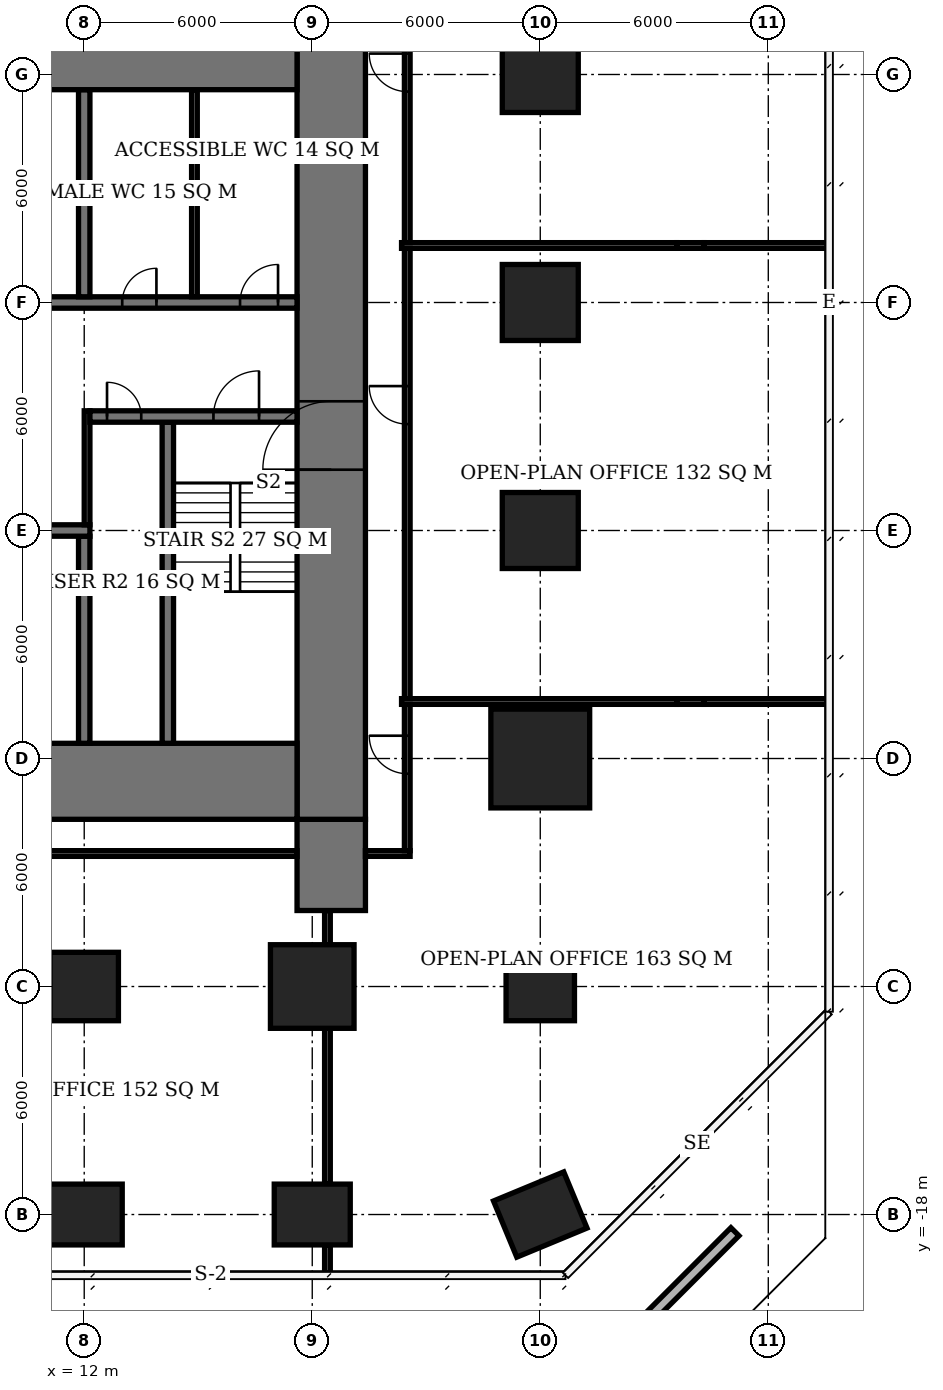
"""IFC4 building model, lengths in metres.
Left out: names, types, materials, properties, quantities, classifications, styles, units other than length and angle.
Written with IfcOpenShell. Run it as: python <this file> out.ifc"""

import sys

from ifc_helpers import new_model, si_unit, direction, frame, frame_2d, origin, origin_2d, place, context, subcontext, project, spatial, rectangle, extrude, element, fill, save


model = new_model("IFC4")
c1 = context("Model", 3, precision=1e-05, world=origin(), true_north=direction((0.0, 1.0)))
c2 = subcontext(c1, "Body", "Model", "MODEL_VIEW")
j1 = project(units=[si_unit("LENGTHUNIT", "METRE"), si_unit("PLANEANGLEUNIT", "RADIAN")], contexts=[c1])
p1 = place(None, origin())
s1 = spatial("IfcSite", under=j1, at=p1, CompositionType="ELEMENT")
p2 = place(p1, origin())
s2 = spatial("IfcBuilding", under=s1, at=p2, CompositionType="ELEMENT")
p3 = place(p2, frame((0.0, 0.0, 65.0)))
s3 = spatial("IfcBuildingStorey", under=s2, at=p3, CompositionType="ELEMENT", Elevation=65.0)
p4 = place(p3, frame((12.0, -18.0, 0.0), z_axis=(0.0, 0.0, 1.0), x_axis=(1.0, 0.0, 0.0)))
e1 = element("IfcColumn", 1, at=p4, inside=s3, PredefinedType="COLUMN", context=c2, shape_type="SweptSolid", body=[
    extrude(rectangle(XDim=2.0, YDim=1.6, at=origin_2d()), origin(), (0.0, 0.0, 1.0), 3.9),
])
p5 = place(p3, frame((12.0, -12.0, 0.0), z_axis=(0.0, 0.0, 1.0), x_axis=(1.0, 0.0, 0.0)))
e2 = element("IfcColumn", 2, at=p5, inside=s3, PredefinedType="COLUMN", context=c2, shape_type="SweptSolid", body=[
    extrude(rectangle(XDim=1.8, YDim=1.8, at=origin_2d()), origin(), (0.0, 0.0, 1.0), 3.9),
])
p6 = place(p3, frame((18.0, -18.0, 0.0), z_axis=(0.0, 0.0, 1.0), x_axis=(1.0, 0.0, 0.0)))
e3 = element("IfcColumn", 3, at=p6, inside=s3, PredefinedType="COLUMN", context=c2, shape_type="SweptSolid", body=[
    extrude(rectangle(XDim=2.0, YDim=1.6, at=origin_2d()), origin(), (0.0, 0.0, 1.0), 3.9),
])
p7 = place(p3, frame((18.0, -12.0, 0.0), z_axis=(0.0, 0.0, 1.0), x_axis=(1.0, 0.0, 0.0)))
e4 = element("IfcColumn", 4, at=p7, inside=s3, PredefinedType="COLUMN", context=c2, shape_type="SweptSolid", body=[
    extrude(rectangle(XDim=2.2, YDim=2.2, at=origin_2d()), origin(), (0.0, 0.0, 1.0), 3.9),
])
p8 = place(p3, frame((24.0, -18.0, 0.0), z_axis=(0.0, 0.0, 1.0), x_axis=(-0.923879532511, -0.382683432365, 0.0)))
e5 = element("IfcColumn", 5, at=p8, inside=s3, PredefinedType="COLUMN", context=c2, shape_type="SweptSolid", body=[
    extrude(rectangle(XDim=2.0, YDim=1.6, at=origin_2d()), origin(), (0.0, 0.0, 1.0), 3.9),
])
p9 = place(p3, frame((24.0, -12.0, 0.0), z_axis=(0.0, 0.0, 1.0), x_axis=(1.0, 0.0, 0.0)))
e6 = element("IfcColumn", 6, at=p9, inside=s3, PredefinedType="COLUMN", context=c2, shape_type="SweptSolid", body=[
    extrude(rectangle(XDim=1.8, YDim=1.8, at=origin_2d()), origin(), (0.0, 0.0, 1.0), 3.9),
])
p10 = place(p3, frame((24.0, -6.0, 0.0), z_axis=(0.0, 0.0, 1.0), x_axis=(1.0, 0.0, 0.0)))
e7 = element("IfcColumn", 7, at=p10, inside=s3, PredefinedType="COLUMN", context=c2, shape_type="SweptSolid", body=[
    extrude(rectangle(XDim=2.6, YDim=2.6, at=origin_2d()), origin(), (0.0, 0.0, 1.0), 3.9),
])
for number, where, z_axis, x_axis in (
    (8, (24.0, 0.0, 0.0), (0.0, 0.0, 1.0), (1.0, 0.0, 0.0)),
    (9, (24.0, 6.0, 0.0), (0.0, 0.0, 1.0), (1.0, 0.0, 0.0)),
    (10, (24.0, 12.0, 0.0), (0.0, 0.0, 1.0), (1.0, 0.0, 0.0)),
):
    element("IfcColumn", number, at=place(p3, frame(where, z_axis=z_axis, x_axis=x_axis)), inside=s3, PredefinedType="COLUMN", context=c2, shape_type="SweptSolid", body=[
        extrude(rectangle(XDim=2.0, YDim=2.0, at=origin_2d()), origin(), (0.0, 0.0, 1.0), 3.9),
    ])
for number, where, z_axis, x_axis in (
    (11, (-5.6, -6.6, 0.0), (0.0, 0.0, 1.0), (1.0, 0.0, 0.0)),
    (12, (-5.6, 12.6, 0.0), (0.0, 0.0, 1.0), (1.0, 0.0, 0.0)),
):
    element("IfcWall", number, at=place(p3, frame(where, z_axis=z_axis, x_axis=x_axis)), inside=s3, PredefinedType="SHEAR", context=c2, shape_type="SweptSolid", body=[
        extrude(rectangle(XDim=23.2, YDim=2.0, at=frame_2d((11.6, 0.0))), origin(), (0.0, 0.0, 1.0), 3.9),
    ])
p11 = place(p3, frame((18.5, -7.6, 0.0), z_axis=(0.0, 0.0, 1.0), x_axis=(0.0, 1.0, 0.0)))
e13 = element("IfcWall", 13, at=p11, inside=s3, PredefinedType="SHEAR", context=c2, shape_type="SweptSolid", body=[
    extrude(rectangle(XDim=21.2, YDim=1.8, at=frame_2d((10.6, 0.0))), origin(), (0.0, 0.0, 1.0), 3.9),
])
p12 = place(p11, frame((9.2, 0.0, 0.0)))
e14 = element("IfcOpeningElement", 14, at=p12, cuts=e13, PredefinedType="OPENING", context=c2, shape_type="SweptSolid", body=[
    extrude(rectangle(XDim=1.8, YDim=2.4, at=frame_2d((0.9, 1.2))), frame((0.0, 0.91, 0.0), z_axis=(0.0, -1.0, 0.0), x_axis=(1.0, 0.0, 0.0)), (0.0, 0.0, 1.0), 1.82),
])
p13 = place(p3, frame((18.5, -10.0, 0.0), z_axis=(0.0, 0.0, 1.0), x_axis=(0.0, 1.0, 0.0)))
e15 = element("IfcWall", 15, at=p13, inside=s3, PredefinedType="SHEAR", context=c2, shape_type="SweptSolid", body=[
    extrude(rectangle(XDim=2.4, YDim=1.8, at=frame_2d((1.2, 0.0))), origin(), (0.0, 0.0, 1.0), 3.9),
])
p14 = place(p3, frame((-5.6, 0.0, 0.0), z_axis=(0.0, 0.0, 1.0), x_axis=(1.0, 0.0, 0.0)))
e16 = element("IfcWall", 16, at=p14, inside=s3, PredefinedType="SHEAR", context=c2, shape_type="SweptSolid", body=[
    extrude(rectangle(XDim=17.75, YDim=0.3, at=frame_2d((8.875, 0.0))), origin(), (0.0, 0.0, 1.0), 3.9),
])
p15 = place(p14, frame((0.6, 0.0, 0.0)))
e17 = element("IfcOpeningElement", 17, at=p15, cuts=e16, PredefinedType="OPENING", context=c2, shape_type="SweptSolid", body=[
    extrude(rectangle(XDim=0.9, YDim=2.1, at=frame_2d((0.45, 1.05))), frame((0.0, 0.16, 0.0), z_axis=(0.0, -1.0, 0.0), x_axis=(1.0, 0.0, 0.0)), (0.0, 0.0, 1.0), 0.32),
])
p16 = place(p3, frame((12.15, 3.0, 0.0), z_axis=(0.0, 0.0, 1.0), x_axis=(1.0, 0.0, 0.0)))
e18 = element("IfcWall", 18, at=p16, inside=s3, PredefinedType="SHEAR", context=c2, shape_type="SweptSolid", body=[
    extrude(rectangle(XDim=5.45, YDim=0.3, at=frame_2d((2.725, 0.0))), origin(), (0.0, 0.0, 1.0), 3.9),
])
p17 = place(p16, frame((3.25, 0.0, 0.0)))
e19 = element("IfcOpeningElement", 19, at=p17, cuts=e18, PredefinedType="OPENING", context=c2, shape_type="SweptSolid", body=[
    extrude(rectangle(XDim=1.2, YDim=2.1, at=frame_2d((0.6, 1.05))), frame((0.0, 0.16, 0.0), z_axis=(0.0, -1.0, 0.0), x_axis=(1.0, 0.0, 0.0)), (0.0, 0.0, 1.0), 0.32),
])
p18 = place(p16, frame((0.45, 0.0, 0.0)))
e20 = element("IfcOpeningElement", 20, at=p18, cuts=e18, PredefinedType="OPENING", context=c2, shape_type="SweptSolid", body=[
    extrude(rectangle(XDim=0.9, YDim=2.1, at=frame_2d((0.45, 1.05))), frame((0.0, 0.16, 0.0), z_axis=(0.0, -1.0, 0.0), x_axis=(1.0, 0.0, 0.0)), (0.0, 0.0, 1.0), 0.32),
])
p19 = place(p3, frame((-0.15, 6.0, 0.0), z_axis=(0.0, 0.0, 1.0), x_axis=(1.0, 0.0, 0.0)))
e21 = element("IfcWall", 21, at=p19, inside=s3, PredefinedType="SHEAR", context=c2, shape_type="SweptSolid", body=[
    extrude(rectangle(XDim=17.75, YDim=0.3, at=frame_2d((8.875, 0.0))), origin(), (0.0, 0.0, 1.0), 3.9),
])
p20 = place(p19, frame((13.15, 0.0, 0.0)))
e22 = element("IfcOpeningElement", 22, at=p20, cuts=e21, PredefinedType="OPENING", context=c2, shape_type="SweptSolid", body=[
    extrude(rectangle(XDim=0.9, YDim=2.1, at=frame_2d((0.45, 1.05))), frame((0.0, 0.16, 0.0), z_axis=(0.0, -1.0, 0.0), x_axis=(1.0, 0.0, 0.0)), (0.0, 0.0, 1.0), 0.32),
])
p21 = place(p19, frame((16.25, 0.0, 0.0)))
e23 = element("IfcOpeningElement", 23, at=p21, cuts=e21, PredefinedType="OPENING", context=c2, shape_type="SweptSolid", body=[
    extrude(rectangle(XDim=1.0, YDim=2.1, at=frame_2d((0.5, 1.05))), frame((0.0, 0.16, 0.0), z_axis=(0.0, -1.0, 0.0), x_axis=(1.0, 0.0, 0.0)), (0.0, 0.0, 1.0), 0.32),
])
p22 = place(p19, frame((1.1, 0.0, 0.0)))
e24 = element("IfcOpeningElement", 24, at=p22, cuts=e21, PredefinedType="OPENING", context=c2, shape_type="SweptSolid", body=[
    extrude(rectangle(XDim=1.1, YDim=2.1, at=frame_2d((0.55, 1.05))), frame((0.0, 0.16, 0.0), z_axis=(0.0, -1.0, 0.0), x_axis=(1.0, 0.0, 0.0)), (0.0, 0.0, 1.0), 0.32),
])
p23 = place(p19, frame((4.1, 0.0, 0.0)))
e25 = element("IfcOpeningElement", 25, at=p23, cuts=e21, PredefinedType="OPENING", context=c2, shape_type="SweptSolid", body=[
    extrude(rectangle(XDim=1.1, YDim=2.1, at=frame_2d((0.55, 1.05))), frame((0.0, 0.16, 0.0), z_axis=(0.0, -1.0, 0.0), x_axis=(1.0, 0.0, 0.0)), (0.0, 0.0, 1.0), 0.32),
])
p24 = place(p19, frame((7.1, 0.0, 0.0)))
e26 = element("IfcOpeningElement", 26, at=p24, cuts=e21, PredefinedType="OPENING", context=c2, shape_type="SweptSolid", body=[
    extrude(rectangle(XDim=1.1, YDim=2.1, at=frame_2d((0.55, 1.05))), frame((0.0, 0.16, 0.0), z_axis=(0.0, -1.0, 0.0), x_axis=(1.0, 0.0, 0.0)), (0.0, 0.0, 1.0), 0.32),
])
p25 = place(p19, frame((10.1, 0.0, 0.0)))
e27 = element("IfcOpeningElement", 27, at=p25, cuts=e21, PredefinedType="OPENING", context=c2, shape_type="SweptSolid", body=[
    extrude(rectangle(XDim=1.1, YDim=2.1, at=frame_2d((0.55, 1.05))), frame((0.0, 0.16, 0.0), z_axis=(0.0, -1.0, 0.0), x_axis=(1.0, 0.0, 0.0)), (0.0, 0.0, 1.0), 0.32),
])
for number, where, z_axis, x_axis in (
    (28, (12.0, -5.6, 0.0), (0.0, 0.0, 1.0), (0.0, 1.0, 0.0)),
    (29, (12.0, 6.15, 0.0), (0.0, 0.0, 1.0), (0.0, 1.0, 0.0)),
):
    element("IfcWall", number, at=place(p3, frame(where, z_axis=z_axis, x_axis=x_axis)), inside=s3, PredefinedType="SHEAR", context=c2, shape_type="SweptSolid", body=[
        extrude(rectangle(XDim=5.45, YDim=0.3, at=frame_2d((2.725, 0.0))), origin(), (0.0, 0.0, 1.0), 3.9),
    ])
p26 = place(p3, frame((14.2, -5.6, 0.0), z_axis=(0.0, 0.0, 1.0), x_axis=(0.0, 1.0, 0.0)))
e30 = element("IfcWall", 30, at=p26, inside=s3, PredefinedType="SHEAR", context=c2, shape_type="SweptSolid", body=[
    extrude(rectangle(XDim=8.45, YDim=0.3, at=frame_2d((4.225, 0.0))), origin(), (0.0, 0.0, 1.0), 3.9),
])
p27 = place(p3, frame((29.123, -18.453, 0.0), z_axis=(0.0, 0.0, 1.0), x_axis=(-0.707106781187, -0.707106781187, 0.0)))
e31 = element("IfcWall", 31, at=p27, inside=s3, PredefinedType="USERDEFINED", context=c2, shape_type="SweptSolid", body=[
    extrude(rectangle(XDim=6.604, YDim=0.3, at=frame_2d((3.302, 0.0))), origin(), (0.0, 0.0, 1.0), 0.6),
])
p28 = place(p3, frame((14.9, 6.15, 0.0), z_axis=(0.0, 0.0, 1.0), x_axis=(0.0, 1.0, 0.0)))
e32 = element("IfcWall", 32, at=p28, inside=s3, PredefinedType="PLUMBINGWALL", context=c2, shape_type="SweptSolid", body=[
    extrude(rectangle(XDim=5.45, YDim=0.15, at=frame_2d((2.725, 0.0))), origin(), (0.0, 0.0, 1.0), 3.65),
])
p29 = place(p3, frame((17.6, -8.5, 0.0), z_axis=(0.0, 0.0, 1.0), x_axis=(-1.0, 0.0, 0.0)))
e33 = element("IfcWall", 33, at=p29, inside=s3, PredefinedType="PARTITIONING", context=c2, shape_type="SweptSolid", body=[
    extrude(rectangle(XDim=13.1, YDim=0.15, at=frame_2d((6.55, 0.0))), origin(), (0.0, 0.0, 1.0), 3.65),
])
p30 = place(p29, frame((8.015, 0.0, 0.0)))
e34 = element("IfcOpeningElement", 34, at=p30, cuts=e33, PredefinedType="OPENING", context=c2, shape_type="SweptSolid", body=[
    extrude(rectangle(XDim=1.0, YDim=2.1, at=frame_2d((0.5, 1.05))), frame((0.0, 0.085, 0.0), z_axis=(0.0, -1.0, 0.0), x_axis=(1.0, 0.0, 0.0)), (0.0, 0.0, 1.0), 0.17),
])
p31 = place(p3, frame((18.4, -19.55, 0.0), z_axis=(0.0, 0.0, 1.0), x_axis=(0.0, 1.0, 0.0)))
e35 = element("IfcWall", 35, at=p31, inside=s3, PredefinedType="PARTITIONING", context=c2, shape_type="SweptSolid", body=[
    extrude(rectangle(XDim=0.75, YDim=0.15, at=frame_2d((0.375, 0.0))), origin(), (0.0, 0.0, 1.0), 3.65),
])
p32 = place(p3, frame((18.4, -17.2, 0.0), z_axis=(0.0, 0.0, 1.0), x_axis=(0.0, 1.0, 0.0)))
e36 = element("IfcWall", 36, at=p32, inside=s3, PredefinedType="PARTITIONING", context=c2, shape_type="SweptSolid", body=[
    extrude(rectangle(XDim=4.1, YDim=0.15, at=frame_2d((2.05, 0.0))), origin(), (0.0, 0.0, 1.0), 3.65),
])
p33 = place(p3, frame((18.4, -10.9, 0.0), z_axis=(0.0, 0.0, 1.0), x_axis=(0.0, 1.0, 0.0)))
e37 = element("IfcWall", 37, at=p33, inside=s3, PredefinedType="PARTITIONING", context=c2, shape_type="SweptSolid", body=[
    extrude(rectangle(XDim=0.9, YDim=0.15, at=frame_2d((0.45, 0.0))), origin(), (0.0, 0.0, 1.0), 3.65),
])
p34 = place(p3, frame((19.4, -8.5, 0.0), z_axis=(0.0, 0.0, 1.0), x_axis=(1.0, 0.0, 0.0)))
e38 = element("IfcWall", 38, at=p34, inside=s3, PredefinedType="PARTITIONING", context=c2, shape_type="SweptSolid", body=[
    extrude(rectangle(XDim=1.175, YDim=0.15, at=frame_2d((0.587, 0.0))), origin(), (0.0, 0.0, 1.0), 3.65),
])
p35 = place(p3, frame((20.5, -8.425, 0.0), z_axis=(0.0, 0.0, 1.0), x_axis=(0.0, 1.0, 0.0)))
e39 = element("IfcWall", 39, at=p35, inside=s3, PredefinedType="PARTITIONING", context=c2, shape_type="SweptSolid", body=[
    extrude(rectangle(XDim=3.85, YDim=0.15, at=frame_2d((1.925, 0.0))), origin(), (0.0, 0.0, 1.0), 3.65),
])
p36 = place(p35, frame((2.025, 0.0, 0.0)))
e40 = element("IfcOpeningElement", 40, at=p36, cuts=e39, PredefinedType="OPENING", context=c2, shape_type="SweptSolid", body=[
    extrude(rectangle(XDim=1.0, YDim=2.1, at=frame_2d((0.5, 1.05))), frame((0.0, 0.085, 0.0), z_axis=(0.0, -1.0, 0.0), x_axis=(1.0, 0.0, 0.0)), (0.0, 0.0, 1.0), 0.17),
])
p37 = place(p3, frame((20.5, -4.425, 0.0), z_axis=(0.0, 0.0, 1.0), x_axis=(0.0, 1.0, 0.0)))
e41 = element("IfcWall", 41, at=p37, inside=s3, PredefinedType="PARTITIONING", context=c2, shape_type="SweptSolid", body=[
    extrude(rectangle(XDim=11.85, YDim=0.15, at=frame_2d((5.925, 0.0))), origin(), (0.0, 0.0, 1.0), 3.65),
])
p38 = place(p37, frame((7.225, 0.0, 0.0)))
e42 = element("IfcOpeningElement", 42, at=p38, cuts=e41, PredefinedType="OPENING", context=c2, shape_type="SweptSolid", body=[
    extrude(rectangle(XDim=1.0, YDim=2.1, at=frame_2d((0.5, 1.05))), frame((0.0, 0.085, 0.0), z_axis=(0.0, -1.0, 0.0), x_axis=(1.0, 0.0, 0.0)), (0.0, 0.0, 1.0), 0.17),
])
p39 = place(p3, frame((20.35, -4.5, 0.0), z_axis=(0.0, 0.0, 1.0), x_axis=(1.0, 0.0, 0.0)))
e43 = element("IfcWall", 43, at=p39, inside=s3, PredefinedType="PARTITIONING", context=c2, shape_type="SweptSolid", body=[
    extrude(rectangle(XDim=7.24, YDim=0.15, at=frame_2d((3.62, 0.0))), origin(), (0.0, 0.0, 1.0), 3.65),
])
p40 = place(p3, frame((27.59, -4.5, 0.0), z_axis=(0.0, 0.0, 1.0), x_axis=(1.0, 0.0, 0.0)))
e44 = element("IfcWall", 44, at=p40, inside=s3, PredefinedType="PARTITIONING", context=c2, shape_type="SweptSolid", body=[
    extrude(rectangle(XDim=0.72, YDim=0.15, at=frame_2d((0.36, 0.0))), origin(), (0.0, 0.0, 1.0), 2.65),
])
p41 = place(p3, frame((28.31, -4.5, 0.0), z_axis=(0.0, 0.0, 1.0), x_axis=(1.0, 0.0, 0.0)))
e45 = element("IfcWall", 45, at=p41, inside=s3, PredefinedType="PARTITIONING", context=c2, shape_type="SweptSolid", body=[
    extrude(rectangle(XDim=3.29, YDim=0.15, at=frame_2d((1.645, 0.0))), origin(), (0.0, 0.0, 1.0), 3.65),
])
p42 = place(p3, frame((20.5, 7.575, 0.0), z_axis=(0.0, 0.0, 1.0), x_axis=(0.0, 1.0, 0.0)))
e46 = element("IfcWall", 46, at=p42, inside=s3, PredefinedType="PARTITIONING", context=c2, shape_type="SweptSolid", body=[
    extrude(rectangle(XDim=6.85, YDim=0.15, at=frame_2d((3.425, 0.0))), origin(), (0.0, 0.0, 1.0), 3.65),
])
p43 = place(p42, frame((3.975, 0.0, 0.0)))
e47 = element("IfcOpeningElement", 47, at=p43, cuts=e46, PredefinedType="OPENING", context=c2, shape_type="SweptSolid", body=[
    extrude(rectangle(XDim=1.0, YDim=2.1, at=frame_2d((0.5, 1.05))), frame((0.0, 0.085, 0.0), z_axis=(0.0, -1.0, 0.0), x_axis=(1.0, 0.0, 0.0)), (0.0, 0.0, 1.0), 0.17),
])
p44 = place(p3, frame((20.35, 7.5, 0.0), z_axis=(0.0, 0.0, 1.0), x_axis=(1.0, 0.0, 0.0)))
e48 = element("IfcWall", 48, at=p44, inside=s3, PredefinedType="PARTITIONING", context=c2, shape_type="SweptSolid", body=[
    extrude(rectangle(XDim=7.24, YDim=0.15, at=frame_2d((3.62, 0.0))), origin(), (0.0, 0.0, 1.0), 3.65),
])
p45 = place(p3, frame((27.59, 7.5, 0.0), z_axis=(0.0, 0.0, 1.0), x_axis=(1.0, 0.0, 0.0)))
e49 = element("IfcWall", 49, at=p45, inside=s3, PredefinedType="PARTITIONING", context=c2, shape_type="SweptSolid", body=[
    extrude(rectangle(XDim=0.72, YDim=0.15, at=frame_2d((0.36, 0.0))), origin(), (0.0, 0.0, 1.0), 2.65),
])
p46 = place(p3, frame((28.31, 7.5, 0.0), z_axis=(0.0, 0.0, 1.0), x_axis=(1.0, 0.0, 0.0)))
e50 = element("IfcWall", 50, at=p46, inside=s3, PredefinedType="PARTITIONING", context=c2, shape_type="SweptSolid", body=[
    extrude(rectangle(XDim=3.29, YDim=0.15, at=frame_2d((1.645, 0.0))), origin(), (0.0, 0.0, 1.0), 3.65),
])
p47 = place(p3, frame((12.075, 0.15, 0.0), z_axis=(0.0, 0.0, 1.0), x_axis=(0.0, 1.0, 0.0)))
e51 = element("IfcWall", 51, at=p47, inside=s3, PredefinedType="PARTITIONING", context=c2, shape_type="SweptSolid", body=[
    extrude(rectangle(XDim=3.0, YDim=0.15, at=frame_2d((1.5, 0.0))), origin(), (0.0, 0.0, 1.0), 3.65),
])
p48 = place(p12, origin())
e52 = element("IfcDoor", 52, at=p48, inside=s3, OperationType="DOUBLE_DOOR_SINGLE_SWING", PredefinedType="DOOR", context=c2, shape_type="SweptSolid", body=[
    extrude(rectangle(XDim=1.8, YDim=2.4, at=frame_2d((0.9, 1.2))), frame((0.0, 0.025, 0.0), z_axis=(0.0, -1.0, 0.0), x_axis=(1.0, 0.0, 0.0)), (0.0, 0.0, 1.0), 0.05),
])
fill(e14, e52)
p49 = place(p17, origin())
e53 = element("IfcDoor", 53, at=p49, inside=s3, OperationType="SINGLE_SWING_RIGHT", PredefinedType="DOOR", context=c2, shape_type="SweptSolid", body=[
    extrude(rectangle(XDim=1.2, YDim=2.1, at=frame_2d((0.6, 1.05))), frame((0.0, 0.025, 0.0), z_axis=(0.0, -1.0, 0.0), x_axis=(1.0, 0.0, 0.0)), (0.0, 0.0, 1.0), 0.05),
])
fill(e19, e53)
p50 = place(p18, origin())
e54 = element("IfcDoor", 54, at=p50, inside=s3, OperationType="SINGLE_SWING_LEFT", PredefinedType="DOOR", context=c2, shape_type="SweptSolid", body=[
    extrude(rectangle(XDim=0.9, YDim=2.1, at=frame_2d((0.45, 1.05))), frame((0.0, 0.025, 0.0), z_axis=(0.0, -1.0, 0.0), x_axis=(1.0, 0.0, 0.0)), (0.0, 0.0, 1.0), 0.05),
])
fill(e20, e54)
p51 = place(p20, origin())
e55 = element("IfcDoor", 55, at=p51, inside=s3, OperationType="SINGLE_SWING_RIGHT", PredefinedType="DOOR", context=c2, shape_type="SweptSolid", body=[
    extrude(rectangle(XDim=0.9, YDim=2.1, at=frame_2d((0.45, 1.05))), frame((0.0, 0.025, 0.0), z_axis=(0.0, -1.0, 0.0), x_axis=(1.0, 0.0, 0.0)), (0.0, 0.0, 1.0), 0.05),
])
fill(e22, e55)
p52 = place(p21, origin())
e56 = element("IfcDoor", 56, at=p52, inside=s3, OperationType="SINGLE_SWING_RIGHT", PredefinedType="DOOR", context=c2, shape_type="SweptSolid", body=[
    extrude(rectangle(XDim=1.0, YDim=2.1, at=frame_2d((0.5, 1.05))), frame((0.0, 0.025, 0.0), z_axis=(0.0, -1.0, 0.0), x_axis=(1.0, 0.0, 0.0)), (0.0, 0.0, 1.0), 0.05),
])
fill(e23, e56)
p53 = place(p36, origin())
e57 = element("IfcDoor", 57, at=p53, inside=s3, OperationType="SINGLE_SWING_RIGHT", PredefinedType="DOOR", context=c2, shape_type="SweptSolid", body=[
    extrude(rectangle(XDim=1.0, YDim=2.1, at=frame_2d((0.5, 1.05))), frame((0.0, 0.025, 0.0), z_axis=(0.0, -1.0, 0.0), x_axis=(1.0, 0.0, 0.0)), (0.0, 0.0, 1.0), 0.05),
])
fill(e40, e57)
p54 = place(p38, origin())
e58 = element("IfcDoor", 58, at=p54, inside=s3, OperationType="SINGLE_SWING_RIGHT", PredefinedType="DOOR", context=c2, shape_type="SweptSolid", body=[
    extrude(rectangle(XDim=1.0, YDim=2.1, at=frame_2d((0.5, 1.05))), frame((0.0, 0.025, 0.0), z_axis=(0.0, -1.0, 0.0), x_axis=(1.0, 0.0, 0.0)), (0.0, 0.0, 1.0), 0.05),
])
fill(e42, e58)
p55 = place(p43, origin())
e59 = element("IfcDoor", 59, at=p55, inside=s3, OperationType="SINGLE_SWING_RIGHT", PredefinedType="DOOR", context=c2, shape_type="SweptSolid", body=[
    extrude(rectangle(XDim=1.0, YDim=2.1, at=frame_2d((0.5, 1.05))), frame((0.0, 0.025, 0.0), z_axis=(0.0, -1.0, 0.0), x_axis=(1.0, 0.0, 0.0)), (0.0, 0.0, 1.0), 0.05),
])
fill(e47, e59)
save(model, sys.argv[1])
